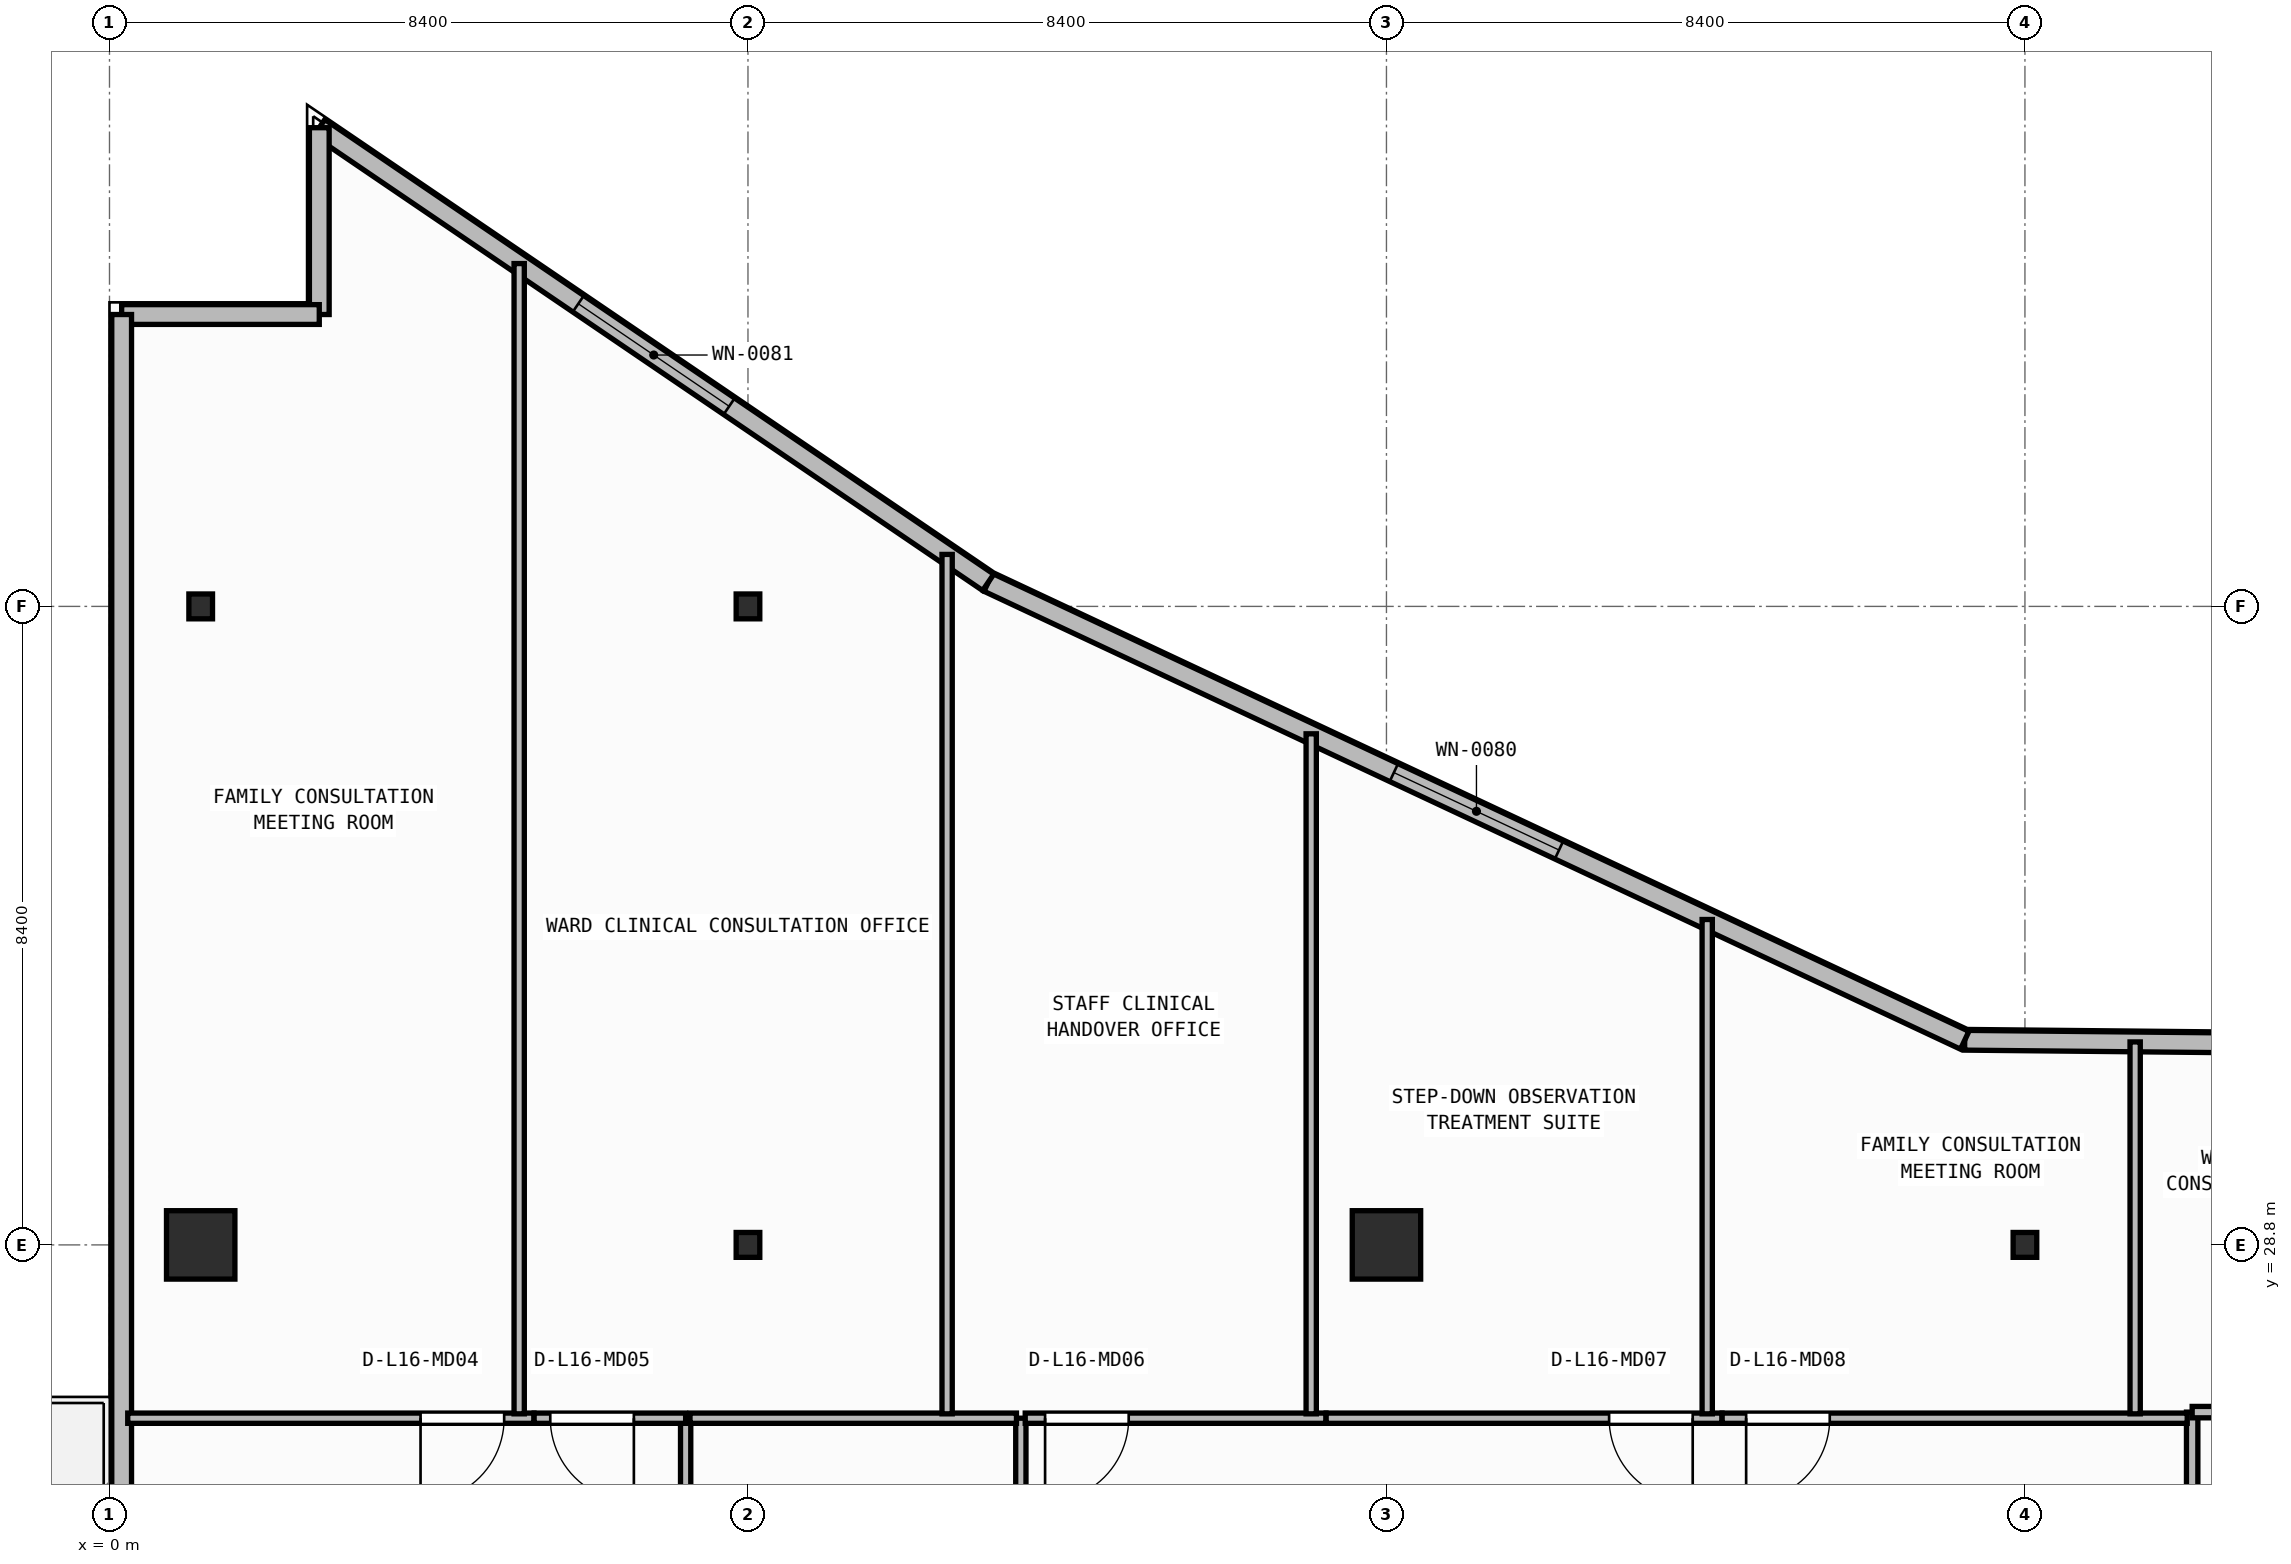
"""IFC4 building model, lengths in metres.
Left out: names, types, materials, properties, quantities, classifications, styles, units other than length and angle.
Written with IfcOpenShell. Run it as: python <this file> out.ifc"""

import sys

from ifc_helpers import new_model, si_unit, direction, frame, frame_2d, origin, origin_2d, place, context, subcontext, project, spatial, rectangle, i_section, extrude, element, fill, save


model = new_model("IFC4")
c1 = context("Model", 3, precision=1e-05, world=origin(), true_north=direction((0.0, 1.0)))
c2 = subcontext(c1, "Body", "Model", "MODEL_VIEW")
j1 = project(units=[si_unit("LENGTHUNIT", "METRE"), si_unit("PLANEANGLEUNIT", "RADIAN")], contexts=[c1])
p1 = place(None, origin())
s1 = spatial("IfcSite", under=j1, at=p1, CompositionType="ELEMENT")
p2 = place(p1, origin())
s2 = spatial("IfcBuilding", under=s1, at=p2, CompositionType="ELEMENT")
p3 = place(p2, frame((0.0, 0.0, 65.95)))
s3 = spatial("IfcBuildingStorey", under=s2, at=p3, CompositionType="ELEMENT", Elevation=65.95)
p4 = place(p3, frame((1.2, 28.8, 0.0), z_axis=(0.0, 0.0, 1.0), x_axis=(1.0, 0.0, 0.0)))
e1 = element("IfcColumn", 1, at=p4, inside=s3, PredefinedType="COLUMN", context=c2, shape_type="SweptSolid", body=[
    extrude(rectangle(XDim=0.9, YDim=0.9, at=origin_2d()), origin(), (0.0, 0.0, 1.0), 3.95),
])
p5 = place(p3, frame((8.4, 28.8, 0.0), z_axis=(0.0, 0.0, 1.0), x_axis=(1.0, 0.0, 0.0)))
e2 = element("IfcColumn", 2, at=p5, inside=s3, PredefinedType="COLUMN", context=c2, shape_type="SweptSolid", body=[
    extrude(i_section(OverallWidth=0.311, OverallDepth=0.327, WebThickness=0.016, FlangeThickness=0.025, FilletRadius=0.017, at=origin_2d()), origin(), (0.0, 0.0, 1.0), 3.95),
])
p6 = place(p3, frame((16.8, 28.8, 0.0), z_axis=(0.0, 0.0, 1.0), x_axis=(1.0, 0.0, 0.0)))
e3 = element("IfcColumn", 3, at=p6, inside=s3, PredefinedType="COLUMN", context=c2, shape_type="SweptSolid", body=[
    extrude(rectangle(XDim=0.9, YDim=0.9, at=origin_2d()), origin(), (0.0, 0.0, 1.0), 3.95),
])
for number, where, z_axis, x_axis in (
    (4, (25.2, 28.8, 0.0), (0.0, 0.0, 1.0), (1.0, 0.0, 0.0)),
    (5, (1.2, 37.2, 0.0), (0.0, 0.0, 1.0), (1.0, 0.0, 0.0)),
    (6, (8.4, 37.2, 0.0), (0.0, 0.0, 1.0), (1.0, 0.0, 0.0)),
):
    element("IfcColumn", number, at=place(p3, frame(where, z_axis=z_axis, x_axis=x_axis)), inside=s3, PredefinedType="COLUMN", context=c2, shape_type="SweptSolid", body=[
        extrude(i_section(OverallWidth=0.311, OverallDepth=0.327, WebThickness=0.016, FlangeThickness=0.025, FilletRadius=0.017, at=origin_2d()), origin(), (0.0, 0.0, 1.0), 3.95),
    ])
p7 = place(p3, frame((39.59, 31.344, 0.0), z_axis=(0.0, 0.0, 1.0), x_axis=(-0.999952362926, 0.009760731435, 0.0)))
e7 = element("IfcWall", 7, at=p7, inside=s3, PredefinedType="STANDARD", context=c2, shape_type="SweptSolid", body=[
    extrude(rectangle(XDim=15.183, YDim=0.26, at=frame_2d((7.591, 0.0))), origin(), (0.0, 0.0, 1.0), 3.71),
])
p8 = place(p7, frame((4.345, 0.0, 0.9)))
e8 = element("IfcOpeningElement", 8, at=p8, cuts=e7, PredefinedType="OPENING", context=c2, shape_type="SweptSolid", body=[
    extrude(rectangle(XDim=2.4, YDim=1.65, at=frame_2d((1.2, 0.825))), frame((0.0, 0.14, 0.0), z_axis=(0.0, -1.0, 0.0), x_axis=(1.0, 0.0, 0.0)), (0.0, 0.0, 1.0), 0.28),
])
p9 = place(p3, frame((24.408, 31.492, 0.0), z_axis=(0.0, 0.0, 1.0), x_axis=(-0.905396522918, 0.424566998585, 0.0)))
e9 = element("IfcWall", 9, at=p9, inside=s3, PredefinedType="STANDARD", context=c2, shape_type="SweptSolid", body=[
    extrude(rectangle(XDim=14.189, YDim=0.26, at=frame_2d((7.095, 0.0))), origin(), (0.0, 0.0, 1.0), 3.71),
])
p10 = place(p9, frame((5.895, 0.0, 0.9)))
e10 = element("IfcOpeningElement", 10, at=p10, cuts=e9, PredefinedType="OPENING", context=c2, shape_type="SweptSolid", body=[
    extrude(rectangle(XDim=2.4, YDim=1.65, at=frame_2d((1.2, 0.825))), frame((0.0, 0.14, 0.0), z_axis=(0.0, -1.0, 0.0), x_axis=(1.0, 0.0, 0.0)), (0.0, 0.0, 1.0), 0.28),
])
p11 = place(p3, frame((11.561, 37.517, 0.0), z_axis=(0.0, 0.0, 1.0), x_axis=(-0.827064743936, 0.562106670782, 0.0)))
e11 = element("IfcWall", 11, at=p11, inside=s3, PredefinedType="STANDARD", context=c2, shape_type="SweptSolid", body=[
    extrude(rectangle(XDim=10.641, YDim=0.26, at=frame_2d((5.32, 0.0))), origin(), (0.0, 0.0, 1.0), 3.71),
])
p12 = place(p11, frame((4.12, 0.0, 0.9)))
e12 = element("IfcOpeningElement", 12, at=p12, cuts=e11, PredefinedType="OPENING", context=c2, shape_type="SweptSolid", body=[
    extrude(rectangle(XDim=2.4, YDim=1.65, at=frame_2d((1.2, 0.825))), frame((0.0, 0.14, 0.0), z_axis=(0.0, -1.0, 0.0), x_axis=(1.0, 0.0, 0.0)), (0.0, 0.0, 1.0), 0.28),
])
p13 = place(p3, frame((2.76, 43.498, 0.0), z_axis=(0.0, 0.0, 1.0), x_axis=(0.0, -1.0, 0.0)))
e13 = element("IfcWall", 13, at=p13, inside=s3, PredefinedType="STANDARD", context=c2, shape_type="SweptSolid", body=[
    extrude(rectangle(XDim=2.458, YDim=0.26, at=frame_2d((1.229, 0.0))), origin(), (0.0, 0.0, 1.0), 3.71),
])
p14 = place(p3, frame((2.76, 41.04, 0.0), z_axis=(0.0, 0.0, 1.0), x_axis=(-1.0, 0.0, 0.0)))
e14 = element("IfcWall", 14, at=p14, inside=s3, PredefinedType="STANDARD", context=c2, shape_type="SweptSolid", body=[
    extrude(rectangle(XDim=2.6, YDim=0.26, at=frame_2d((1.3, 0.0))), origin(), (0.0, 0.0, 1.0), 3.71),
])
p15 = place(p3, frame((0.16, 41.04, 0.0), z_axis=(0.0, 0.0, 1.0), x_axis=(0.0, -1.0, 0.0)))
e15 = element("IfcWall", 15, at=p15, inside=s3, PredefinedType="STANDARD", context=c2, shape_type="SweptSolid", body=[
    extrude(rectangle(XDim=38.28, YDim=0.26, at=frame_2d((19.14, 0.0))), origin(), (0.0, 0.0, 1.0), 3.71),
])
p16 = place(p15, frame((22.743, 0.0, 0.0)))
e16 = element("IfcOpeningElement", 16, at=p16, cuts=e15, PredefinedType="OPENING", context=c2, shape_type="SweptSolid", body=[
    extrude(rectangle(XDim=1.3, YDim=2.15, at=frame_2d((0.65, 1.075))), frame((0.0, 0.14, 0.0), z_axis=(0.0, -1.0, 0.0), x_axis=(1.0, 0.0, 0.0)), (0.0, 0.0, 1.0), 0.28),
])
p17 = place(p3, frame((27.4, 26.6, 0.0), z_axis=(0.0, 0.0, 1.0), x_axis=(0.0, -1.0, 0.0)))
e17 = element("IfcWall", 17, at=p17, inside=s3, PredefinedType="PARTITIONING", context=c2, shape_type="SweptSolid", body=[
    extrude(rectangle(XDim=11.9, YDim=0.15, at=frame_2d((5.95, 0.0))), origin(), (0.0, 0.0, 1.0), 3.71),
])
p18 = place(p3, frame((29.9, 26.6, 0.0), z_axis=(0.0, 0.0, 1.0), x_axis=(-1.0, 0.0, 0.0)))
e18 = element("IfcWall", 18, at=p18, inside=s3, PredefinedType="PARTITIONING", context=c2, shape_type="SweptSolid", body=[
    extrude(rectangle(XDim=2.5, YDim=0.15, at=frame_2d((1.25, 0.0))), origin(), (0.0, 0.0, 1.0), 3.71),
])
p19 = place(p18, frame((0.225, 0.0, 0.0)))
e19 = element("IfcOpeningElement", 19, at=p19, cuts=e18, PredefinedType="OPENING", context=c2, shape_type="SweptSolid", body=[
    extrude(rectangle(XDim=1.1, YDim=2.1, at=frame_2d((0.55, 1.05))), frame((0.0, 0.085, 0.0), z_axis=(0.0, -1.0, 0.0), x_axis=(1.0, 0.0, 0.0)), (0.0, 0.0, 1.0), 0.17),
])
p20 = place(p3, frame((7.58, 14.76, 0.0), z_axis=(0.0, 0.0, 1.0), x_axis=(0.0, 1.0, 0.0)))
e20 = element("IfcWall", 20, at=p20, inside=s3, PredefinedType="PARTITIONING", context=c2, shape_type="SweptSolid", body=[
    extrude(rectangle(XDim=11.76, YDim=0.135, at=frame_2d((5.88, 0.0))), origin(), (0.0, 0.0, 1.0), 3.71),
])
p21 = place(p3, frame((5.585, 26.52, 0.0), z_axis=(0.0, 0.0, 1.0), x_axis=(-1.0, 0.0, 0.0)))
e21 = element("IfcWall", 21, at=p21, inside=s3, PredefinedType="PARTITIONING", context=c2, shape_type="SweptSolid", body=[
    extrude(rectangle(XDim=5.345, YDim=0.135, at=frame_2d((2.672, 0.0))), origin(), (0.0, 0.0, 1.0), 3.71),
])
p22 = place(p21, frame((0.392, 0.0, 0.0)))
e22 = element("IfcOpeningElement", 22, at=p22, cuts=e21, PredefinedType="OPENING", context=c2, shape_type="SweptSolid", body=[
    extrude(rectangle(XDim=1.1, YDim=2.1, at=frame_2d((0.55, 1.05))), frame((0.0, 0.077, 0.0), z_axis=(0.0, -1.0, 0.0), x_axis=(1.0, 0.0, 0.0)), (0.0, 0.0, 1.0), 0.155),
])
p23 = place(p3, frame((7.58, 26.52, 0.0), z_axis=(0.0, 0.0, 1.0), x_axis=(-1.0, 0.0, 0.0)))
e23 = element("IfcWall", 23, at=p23, inside=s3, PredefinedType="PARTITIONING", context=c2, shape_type="SweptSolid", body=[
    extrude(rectangle(XDim=1.993, YDim=0.135, at=frame_2d((0.997, 0.0))), origin(), (0.0, 0.0, 1.0), 3.71),
])
p24 = place(p23, frame((0.681, 0.0, 0.0)))
e24 = element("IfcOpeningElement", 24, at=p24, cuts=e23, PredefinedType="OPENING", context=c2, shape_type="SweptSolid", body=[
    extrude(rectangle(XDim=1.1, YDim=2.1, at=frame_2d((0.55, 1.05))), frame((0.0, 0.077, 0.0), z_axis=(0.0, -1.0, 0.0), x_axis=(1.0, 0.0, 0.0)), (0.0, 0.0, 1.0), 0.155),
])
p25 = place(p3, frame((11.99, 14.76, 0.0), z_axis=(0.0, 0.0, 1.0), x_axis=(0.0, 1.0, 0.0)))
e25 = element("IfcWall", 25, at=p25, inside=s3, PredefinedType="PARTITIONING", context=c2, shape_type="SweptSolid", body=[
    extrude(rectangle(XDim=11.76, YDim=0.135, at=frame_2d((5.88, 0.0))), origin(), (0.0, 0.0, 1.0), 3.71),
])
p26 = place(p3, frame((11.933, 26.52, 0.0), z_axis=(0.0, 0.0, 1.0), x_axis=(-1.0, 0.0, 0.0)))
e26 = element("IfcWall", 26, at=p26, inside=s3, PredefinedType="PARTITIONING", context=c2, shape_type="SweptSolid", body=[
    extrude(rectangle(XDim=4.295, YDim=0.135, at=frame_2d((2.147, 0.0))), origin(), (0.0, 0.0, 1.0), 3.71),
])
p27 = place(p3, frame((16.005, 26.52, 0.0), z_axis=(0.0, 0.0, 1.0), x_axis=(-1.0, 0.0, 0.0)))
e27 = element("IfcWall", 27, at=p27, inside=s3, PredefinedType="PARTITIONING", context=c2, shape_type="SweptSolid", body=[
    extrude(rectangle(XDim=3.957, YDim=0.135, at=frame_2d((1.979, 0.0))), origin(), (0.0, 0.0, 1.0), 3.71),
])
p28 = place(p27, frame((2.596, 0.0, 0.0)))
e28 = element("IfcOpeningElement", 28, at=p28, cuts=e27, PredefinedType="OPENING", context=c2, shape_type="SweptSolid", body=[
    extrude(rectangle(XDim=1.1, YDim=2.1, at=frame_2d((0.55, 1.05))), frame((0.0, 0.077, 0.0), z_axis=(0.0, -1.0, 0.0), x_axis=(1.0, 0.0, 0.0)), (0.0, 0.0, 1.0), 0.155),
])
p29 = place(p3, frame((21.215, 26.52, 0.0), z_axis=(0.0, 0.0, 1.0), x_axis=(-1.0, 0.0, 0.0)))
e29 = element("IfcWall", 29, at=p29, inside=s3, PredefinedType="PARTITIONING", context=c2, shape_type="SweptSolid", body=[
    extrude(rectangle(XDim=5.208, YDim=0.135, at=frame_2d((2.604, 0.0))), origin(), (0.0, 0.0, 1.0), 3.71),
])
p30 = place(p29, frame((0.385, 0.0, 0.0)))
e30 = element("IfcOpeningElement", 30, at=p30, cuts=e29, PredefinedType="OPENING", context=c2, shape_type="SweptSolid", body=[
    extrude(rectangle(XDim=1.1, YDim=2.1, at=frame_2d((0.55, 1.05))), frame((0.0, 0.077, 0.0), z_axis=(0.0, -1.0, 0.0), x_axis=(1.0, 0.0, 0.0)), (0.0, 0.0, 1.0), 0.155),
])
p31 = place(p3, frame((27.335, 26.52, 0.0), z_axis=(0.0, 0.0, 1.0), x_axis=(-1.0, 0.0, 0.0)))
e31 = element("IfcWall", 31, at=p31, inside=s3, PredefinedType="PARTITIONING", context=c2, shape_type="SweptSolid", body=[
    extrude(rectangle(XDim=6.118, YDim=0.135, at=frame_2d((3.059, 0.0))), origin(), (0.0, 0.0, 1.0), 3.71),
])
p32 = place(p31, frame((4.703, 0.0, 0.0)))
e32 = element("IfcOpeningElement", 32, at=p32, cuts=e31, PredefinedType="OPENING", context=c2, shape_type="SweptSolid", body=[
    extrude(rectangle(XDim=1.1, YDim=2.1, at=frame_2d((0.55, 1.05))), frame((0.0, 0.077, 0.0), z_axis=(0.0, -1.0, 0.0), x_axis=(1.0, 0.0, 0.0)), (0.0, 0.0, 1.0), 0.155),
])
p33 = place(p3, frame((5.39, 26.577, 0.0), z_axis=(0.0, 0.0, 1.0), x_axis=(0.0, 1.0, 0.0)))
e33 = element("IfcWall", 33, at=p33, inside=s3, PredefinedType="PARTITIONING", context=c2, shape_type="SweptSolid", body=[
    extrude(rectangle(XDim=15.133, YDim=0.135, at=frame_2d((7.566, 0.0))), origin(), (0.0, 0.0, 1.0), 3.71),
])
p34 = place(p3, frame((11.02, 26.577, 0.0), z_axis=(0.0, 0.0, 1.0), x_axis=(0.0, 1.0, 0.0)))
e34 = element("IfcWall", 34, at=p34, inside=s3, PredefinedType="PARTITIONING", context=c2, shape_type="SweptSolid", body=[
    extrude(rectangle(XDim=11.306, YDim=0.135, at=frame_2d((5.653, 0.0))), origin(), (0.0, 0.0, 1.0), 3.71),
])
p35 = place(p3, frame((15.81, 26.577, 0.0), z_axis=(0.0, 0.0, 1.0), x_axis=(0.0, 1.0, 0.0)))
e35 = element("IfcWall", 35, at=p35, inside=s3, PredefinedType="PARTITIONING", context=c2, shape_type="SweptSolid", body=[
    extrude(rectangle(XDim=8.947, YDim=0.135, at=frame_2d((4.473, 0.0))), origin(), (0.0, 0.0, 1.0), 3.71),
])
p36 = place(p3, frame((21.02, 26.577, 0.0), z_axis=(0.0, 0.0, 1.0), x_axis=(0.0, 1.0, 0.0)))
e36 = element("IfcWall", 36, at=p36, inside=s3, PredefinedType="PARTITIONING", context=c2, shape_type="SweptSolid", body=[
    extrude(rectangle(XDim=6.503, YDim=0.135, at=frame_2d((3.252, 0.0))), origin(), (0.0, 0.0, 1.0), 3.71),
])
p37 = place(p3, frame((26.65, 26.577, 0.0), z_axis=(0.0, 0.0, 1.0), x_axis=(0.0, 1.0, 0.0)))
e37 = element("IfcWall", 37, at=p37, inside=s3, PredefinedType="PARTITIONING", context=c2, shape_type="SweptSolid", body=[
    extrude(rectangle(XDim=4.893, YDim=0.135, at=frame_2d((2.447, 0.0))), origin(), (0.0, 0.0, 1.0), 3.71),
])
p38 = place(p10, origin())
e38 = element("IfcWindow", 38, at=p38, inside=s3, PartitioningType="SINGLE_PANEL", PredefinedType="WINDOW", context=c2, shape_type="SweptSolid", body=[
    extrude(rectangle(XDim=2.4, YDim=1.65, at=frame_2d((1.2, 0.825))), frame((0.0, 0.03, 0.0), z_axis=(0.0, -1.0, 0.0), x_axis=(1.0, 0.0, 0.0)), (0.0, 0.0, 1.0), 0.06),
])
fill(e10, e38)
p39 = place(p12, origin())
e39 = element("IfcWindow", 39, at=p39, inside=s3, PartitioningType="SINGLE_PANEL", PredefinedType="WINDOW", context=c2, shape_type="SweptSolid", body=[
    extrude(rectangle(XDim=2.4, YDim=1.65, at=frame_2d((1.2, 0.825))), frame((0.0, 0.03, 0.0), z_axis=(0.0, -1.0, 0.0), x_axis=(1.0, 0.0, 0.0)), (0.0, 0.0, 1.0), 0.06),
])
fill(e12, e39)
p40 = place(p22, origin())
e40 = element("IfcDoor", 40, at=p40, inside=s3, OperationType="SINGLE_SWING_RIGHT", PredefinedType="DOOR", context=c2, shape_type="SweptSolid", body=[
    extrude(rectangle(XDim=1.1, YDim=2.1, at=frame_2d((0.55, 1.05))), frame((0.0, 0.025, 0.0), z_axis=(0.0, -1.0, 0.0), x_axis=(1.0, 0.0, 0.0)), (0.0, 0.0, 1.0), 0.05),
])
fill(e22, e40)
p41 = place(p24, origin())
e41 = element("IfcDoor", 41, at=p41, inside=s3, OperationType="SINGLE_SWING_LEFT", PredefinedType="DOOR", context=c2, shape_type="SweptSolid", body=[
    extrude(rectangle(XDim=1.1, YDim=2.1, at=frame_2d((0.55, 1.05))), frame((0.0, 0.025, 0.0), z_axis=(0.0, -1.0, 0.0), x_axis=(1.0, 0.0, 0.0)), (0.0, 0.0, 1.0), 0.05),
])
fill(e24, e41)
p42 = place(p28, origin())
e42 = element("IfcDoor", 42, at=p42, inside=s3, OperationType="SINGLE_SWING_RIGHT", PredefinedType="DOOR", context=c2, shape_type="SweptSolid", body=[
    extrude(rectangle(XDim=1.1, YDim=2.1, at=frame_2d((0.55, 1.05))), frame((0.0, 0.025, 0.0), z_axis=(0.0, -1.0, 0.0), x_axis=(1.0, 0.0, 0.0)), (0.0, 0.0, 1.0), 0.05),
])
fill(e28, e42)
p43 = place(p30, origin())
e43 = element("IfcDoor", 43, at=p43, inside=s3, OperationType="SINGLE_SWING_LEFT", PredefinedType="DOOR", context=c2, shape_type="SweptSolid", body=[
    extrude(rectangle(XDim=1.1, YDim=2.1, at=frame_2d((0.55, 1.05))), frame((0.0, 0.025, 0.0), z_axis=(0.0, -1.0, 0.0), x_axis=(1.0, 0.0, 0.0)), (0.0, 0.0, 1.0), 0.05),
])
fill(e30, e43)
p44 = place(p32, origin())
e44 = element("IfcDoor", 44, at=p44, inside=s3, OperationType="SINGLE_SWING_RIGHT", PredefinedType="DOOR", context=c2, shape_type="SweptSolid", body=[
    extrude(rectangle(XDim=1.1, YDim=2.1, at=frame_2d((0.55, 1.05))), frame((0.0, 0.025, 0.0), z_axis=(0.0, -1.0, 0.0), x_axis=(1.0, 0.0, 0.0)), (0.0, 0.0, 1.0), 0.05),
])
fill(e32, e44)
save(model, sys.argv[1])
